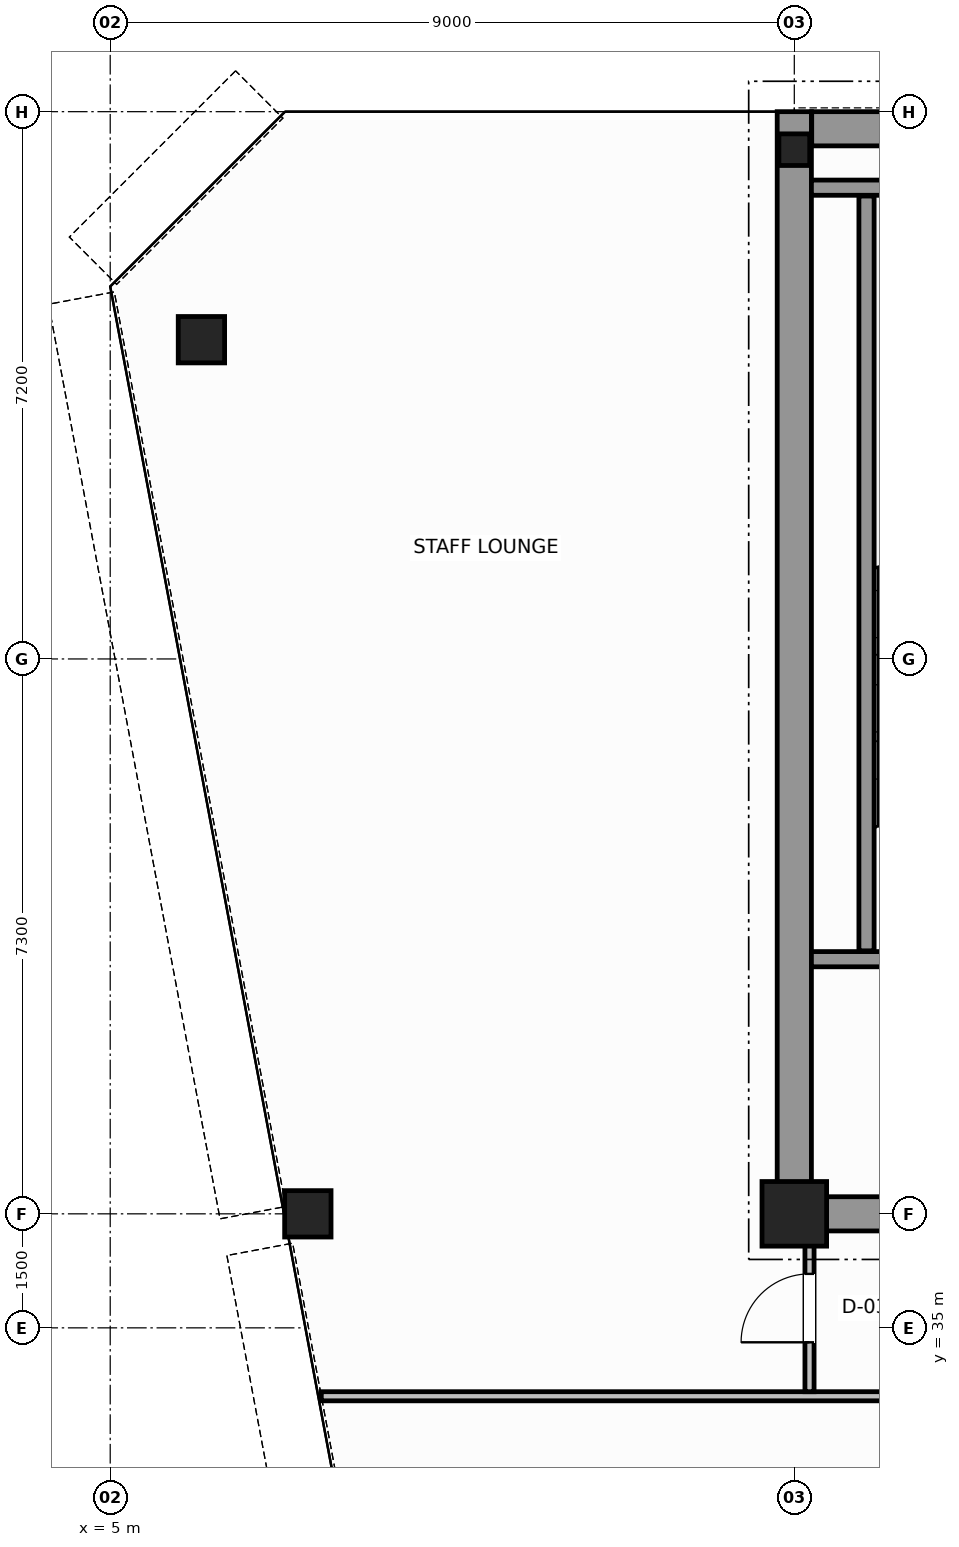
"""IFC4 building model, lengths in metres.
Left out: names, types, materials, properties, quantities, classifications, styles, units other than length and angle.
Written with IfcOpenShell. Run it as: python <this file> out.ifc"""

import sys

from ifc_helpers import new_model, si_unit, direction, frame, frame_2d, origin, origin_2d, place, context, subcontext, project, spatial, rectangle, hollow_circle, i_section, extrude, source, transform, mapped, element, fill, save


model = new_model("IFC4")
c1 = context("Model", 3, precision=1e-05, world=origin(), true_north=direction((0.0, 1.0)))
c2 = subcontext(c1, "Body", "Model", "MODEL_VIEW")
j1 = project(units=[si_unit("LENGTHUNIT", "METRE"), si_unit("PLANEANGLEUNIT", "RADIAN")], contexts=[c1])
p1 = place(None, origin())
s1 = spatial("IfcSite", under=j1, at=p1, CompositionType="ELEMENT")
p2 = place(p1, origin())
s2 = spatial("IfcBuilding", under=s1, at=p2, CompositionType="ELEMENT")
p3 = place(p2, frame((0.0, 0.0, 284.0)))
s3 = spatial("IfcBuildingStorey", under=s2, at=p3, CompositionType="ELEMENT", Elevation=284.0)
m1 = source(origin(), c2, "Body", "SweptSolid", [
    extrude(rectangle(XDim=0.85, YDim=0.85, at=origin_2d()), origin(), (0.0, 0.0, 1.0), 3.8),
])
p4 = place(p3, frame((14.0, 36.5, 0.0), z_axis=(0.0, 0.0, 1.0), x_axis=(1.0, 0.0, 0.0)))
e1 = element("IfcColumn", 1, at=p4, inside=s3, PredefinedType="COLUMN", context=c2, shape_type="MappedRepresentation", body=[
    mapped(m1, transform((0.0, 0.0, 0.0), scale=1.0)),
])
m2 = source(origin(), c2, "Body", "SweptSolid", [
    extrude(i_section(OverallWidth=0.406, OverallDepth=0.416, WebThickness=0.03, FlangeThickness=0.042, FilletRadius=0.015, at=origin_2d()), origin(), (0.0, 0.0, 1.0), 3.8),
])
p5 = place(p3, frame((14.0, 50.5, 0.0), z_axis=(0.0, 0.0, 1.0), x_axis=(1.0, 0.0, 0.0)))
e2 = element("IfcColumn", 2, at=p5, inside=s3, PredefinedType="COLUMN", context=c2, shape_type="MappedRepresentation", body=[
    mapped(m2, transform((0.0, 0.0, 0.0), scale=1.0)),
])
m3 = source(origin(), c2, "Body", "SweptSolid", [
    extrude(hollow_circle(Radius=0.305, WallThickness=0.03, at=origin_2d()), origin(), (0.0, 0.0, 1.0), 3.8),
])
for number, where, z_axis, x_axis in (
    (3, (6.2, 48.0, 0.0), (0.0, 0.0, 1.0), (1.0, 0.0, 0.0)),
    (4, (7.6, 36.5, 0.0), (0.0, 0.0, 1.0), (1.0, 0.0, 0.0)),
):
    element("IfcColumn", number, at=place(p3, frame(where, z_axis=z_axis, x_axis=x_axis)), inside=s3, PredefinedType="COLUMN", context=c2, shape_type="MappedRepresentation", body=[
        mapped(m3, transform((0.0, 0.0, 0.0), scale=1.0)),
    ])
p6 = place(p3, frame((14.229, 50.775, 0.0), z_axis=(0.0, 0.0, 1.0), x_axis=(1.0, 0.0, 0.0)))
e5 = element("IfcWall", 5, at=p6, inside=s3, PredefinedType="SHEAR", context=c2, shape_type="SweptSolid", body=[
    extrude(rectangle(XDim=19.769, YDim=0.45, at=frame_2d((9.885, 0.0))), origin(), (0.0, 0.0, 1.0), 3.8),
])
p7 = place(p3, frame((14.0, 36.5, 0.0), z_axis=(0.0, 0.0, 1.0), x_axis=(0.0, 1.0, 0.0)))
e6 = element("IfcWall", 6, at=p7, inside=s3, PredefinedType="SHEAR", context=c2, shape_type="SweptSolid", body=[
    extrude(rectangle(XDim=14.5, YDim=0.45, at=frame_2d((7.25, 0.0))), origin(), (0.0, 0.0, 1.0), 3.8),
])
p8 = place(p3, frame((14.245, 36.5, 0.0), z_axis=(0.0, 0.0, 1.0), x_axis=(1.0, 0.0, 0.0)))
e7 = element("IfcWall", 7, at=p8, inside=s3, PredefinedType="SHEAR", context=c2, shape_type="SweptSolid", body=[
    extrude(rectangle(XDim=3.955, YDim=0.45, at=frame_2d((1.978, 0.0))), origin(), (0.0, 0.0, 1.0), 2.58),
])
p9 = place(p3, frame((14.225, 39.85, 0.0), z_axis=(0.0, 0.0, 1.0), x_axis=(1.0, 0.0, 0.0)))
e8 = element("IfcWall", 8, at=p9, inside=s3, PredefinedType="SOLIDWALL", context=c2, shape_type="SweptSolid", body=[
    extrude(rectangle(XDim=4.375, YDim=0.2, at=frame_2d((2.188, 0.0))), origin(), (0.0, 0.0, 1.0), 3.8),
])
p10 = place(p9, frame((1.95, 0.0, 0.0)))
e9 = element("IfcOpeningElement", 9, at=p10, cuts=e8, PredefinedType="OPENING", context=c2, shape_type="SweptSolid", body=[
    extrude(rectangle(XDim=1.1, YDim=2.15, at=frame_2d((0.55, 1.075))), frame((0.0, 0.11, 0.0), z_axis=(0.0, -1.0, 0.0), x_axis=(1.0, 0.0, 0.0)), (0.0, 0.0, 1.0), 0.22),
])
p11 = place(p3, frame((14.225, 50.0, 0.0), z_axis=(0.0, 0.0, 1.0), x_axis=(1.0, 0.0, 0.0)))
e10 = element("IfcWall", 10, at=p11, inside=s3, PredefinedType="SOLIDWALL", context=c2, shape_type="SweptSolid", body=[
    extrude(rectangle(XDim=4.375, YDim=0.2, at=frame_2d((2.188, 0.0))), origin(), (0.0, 0.0, 1.0), 3.8),
])
p12 = place(p3, frame((14.95, 39.96, 0.0), z_axis=(0.0, 0.0, 1.0), x_axis=(0.0, 1.0, 0.0)))
e11 = element("IfcWall", 11, at=p12, inside=s3, PredefinedType="SOLIDWALL", context=c2, shape_type="SweptSolid", body=[
    extrude(rectangle(XDim=9.93, YDim=0.2, at=frame_2d((4.965, 0.0))), origin(), (0.0, 0.0, 1.0), 3.8),
])
p13 = place(p3, frame((7.777, 34.1, 0.0), z_axis=(0.0, 0.0, 1.0), x_axis=(1.0, 0.0, 0.0)))
e12 = element("IfcWall", 12, at=p13, inside=s3, PredefinedType="PARTITIONING", context=c2, shape_type="SweptSolid", body=[
    extrude(rectangle(XDim=11.563, YDim=0.12, at=frame_2d((5.782, 0.0))), origin(), (0.0, 0.0, 1.0), 3.58),
])
p14 = place(p3, frame((14.2, 34.16, 0.0), z_axis=(0.0, 0.0, 1.0), x_axis=(0.0, 1.0, 0.0)))
e13 = element("IfcWall", 13, at=p14, inside=s3, PredefinedType="PARTITIONING", context=c2, shape_type="SweptSolid", body=[
    extrude(rectangle(XDim=2.28, YDim=0.12, at=frame_2d((1.14, 0.0))), origin(), (0.0, 0.0, 1.0), 3.58),
])
p15 = place(p14, frame((0.65, 0.0, 0.0)))
e14 = element("IfcOpeningElement", 14, at=p15, cuts=e13, PredefinedType="OPENING", context=c2, shape_type="SweptSolid", body=[
    extrude(rectangle(XDim=0.9, YDim=2.15, at=frame_2d((0.45, 1.075))), frame((0.0, 0.07, 0.0), z_axis=(0.0, -1.0, 0.0), x_axis=(1.0, 0.0, 0.0)), (0.0, 0.0, 1.0), 0.14),
])
m4 = source(origin(), c2, "Body", "SweptSolid", [
    extrude(rectangle(XDim=0.9, YDim=2.15, at=frame_2d((0.45, 1.075))), frame((0.0, 0.025, 0.0), z_axis=(0.0, -1.0, 0.0), x_axis=(1.0, 0.0, 0.0)), (0.0, 0.0, 1.0), 0.05),
])
p16 = place(p15, origin())
e15 = element("IfcDoor", 15, at=p16, inside=s3, OperationType="SINGLE_SWING_LEFT", PredefinedType="DOOR", context=c2, shape_type="MappedRepresentation", body=[
    mapped(m4, transform((0.0, 0.0, 0.0), scale=1.0)),
])
fill(e14, e15)
save(model, sys.argv[1])
